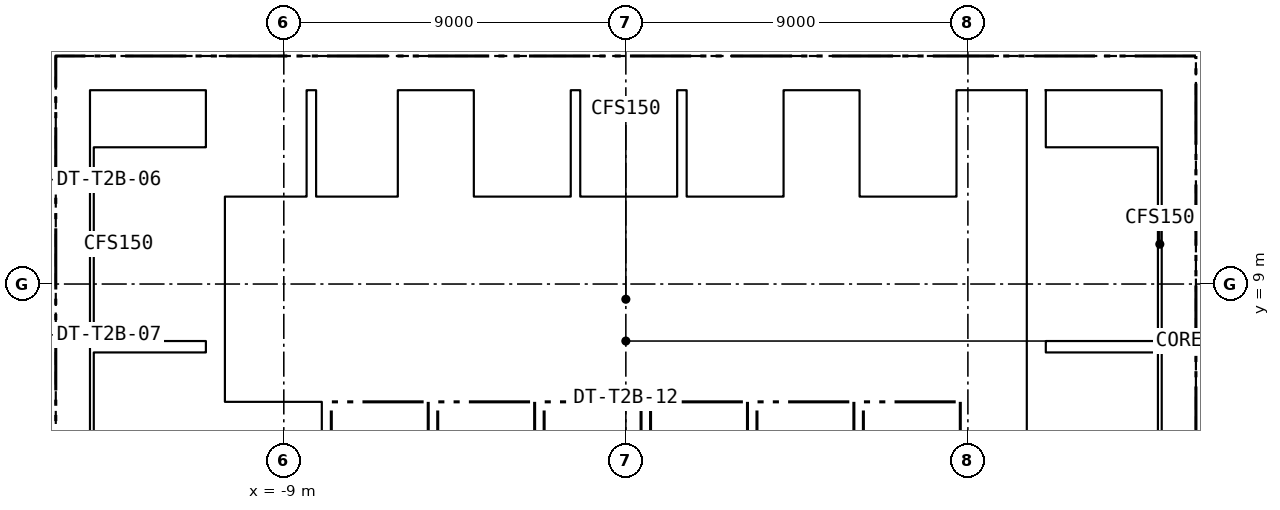
"""IFC4 building model, lengths in metres.
Left out: names, types, materials, properties, quantities, classifications, styles, units other than length and angle.
Written with IfcOpenShell. Run it as: python <this file> out.ifc"""

import sys

from ifc_helpers import new_model, si_unit, direction, frame, frame_2d, origin, place, context, subcontext, project, spatial, rectangle, extrude, element, fill, save


model = new_model("IFC4")
c1 = context("Model", 3, precision=1e-05, world=origin(), true_north=direction((0.0, 1.0)))
c2 = subcontext(c1, "Body", "Model", "MODEL_VIEW")
j1 = project(units=[si_unit("LENGTHUNIT", "METRE"), si_unit("PLANEANGLEUNIT", "RADIAN")], contexts=[c1])
p1 = place(None, origin())
s1 = spatial("IfcSite", under=j1, at=p1, CompositionType="ELEMENT")
p2 = place(p1, origin())
s2 = spatial("IfcBuilding", under=s1, at=p2, CompositionType="ELEMENT")
p3 = place(p2, frame((0.0, 0.0, 91.6)))
s3 = spatial("IfcBuildingStorey", under=s2, at=p3, CompositionType="ELEMENT", Elevation=91.6)
p4 = place(p3, frame((-15.0, 14.55, -0.15), z_axis=(0.0, 0.0, 1.0), x_axis=(1.0, 0.0, 0.0)))
e1 = element("IfcWall", 1, at=p4, inside=s3, PredefinedType="SOLIDWALL", context=c2, shape_type="SweptSolid", body=[
    extrude(rectangle(XDim=30.0, YDim=0.9, at=frame_2d((15.0, 0.0))), origin(), (0.0, 0.0, 1.0), 3.65),
])
p5 = place(p4, frame((9.25, 0.0, 0.15)))
e2 = element("IfcOpeningElement", 2, at=p5, cuts=e1, PredefinedType="OPENING", context=c2, shape_type="SweptSolid", body=[
    extrude(rectangle(XDim=1.5, YDim=2.1, at=frame_2d((0.75, 1.05))), frame((0.0, 0.46, 0.0), z_axis=(0.0, -1.0, 0.0), x_axis=(1.0, 0.0, 0.0)), (0.0, 0.0, 1.0), 0.92),
])
p6 = place(p4, frame((19.4, 0.0, 0.15)))
e3 = element("IfcOpeningElement", 3, at=p6, cuts=e1, PredefinedType="OPENING", context=c2, shape_type="SweptSolid", body=[
    extrude(rectangle(XDim=1.5, YDim=2.1, at=frame_2d((0.75, 1.05))), frame((0.0, 0.46, 0.0), z_axis=(0.0, -1.0, 0.0), x_axis=(1.0, 0.0, 0.0)), (0.0, 0.0, 1.0), 0.92),
])
p7 = place(p4, frame((1.5, 0.0, 0.15)))
e4 = element("IfcOpeningElement", 4, at=p7, cuts=e1, PredefinedType="OPENING", context=c2, shape_type="SweptSolid", body=[
    extrude(rectangle(XDim=1.2, YDim=2.1, at=frame_2d((0.6, 1.05))), frame((0.0, 0.46, 0.0), z_axis=(0.0, -1.0, 0.0), x_axis=(1.0, 0.0, 0.0)), (0.0, 0.0, 1.0), 0.92),
])
p8 = place(p4, frame((27.3, 0.0, 0.15)))
e5 = element("IfcOpeningElement", 5, at=p8, cuts=e1, PredefinedType="OPENING", context=c2, shape_type="SweptSolid", body=[
    extrude(rectangle(XDim=1.2, YDim=2.1, at=frame_2d((0.6, 1.05))), frame((0.0, 0.46, 0.0), z_axis=(0.0, -1.0, 0.0), x_axis=(1.0, 0.0, 0.0)), (0.0, 0.0, 1.0), 0.92),
])
for number, where, z_axis, x_axis in (
    (6, (-14.55, 0.9, -0.15), (0.0, 0.0, 1.0), (0.0, 1.0, 0.0)),
    (7, (14.55, 0.9, -0.15), (0.0, 0.0, 1.0), (0.0, 1.0, 0.0)),
):
    element("IfcWall", number, at=place(p3, frame(where, z_axis=z_axis, x_axis=x_axis)), inside=s3, PredefinedType="SOLIDWALL", context=c2, shape_type="SweptSolid", body=[
        extrude(rectangle(XDim=13.2, YDim=0.9, at=frame_2d((6.6, 0.0))), origin(), (0.0, 0.0, 1.0), 3.65),
    ])
for number, where, z_axis, x_axis in (
    (8, (-10.8, 0.9, -0.15), (0.0, 0.0, 1.0), (0.0, 1.0, 0.0)),
    (9, (10.8, 0.9, -0.15), (0.0, 0.0, 1.0), (0.0, 1.0, 0.0)),
):
    element("IfcWall", number, at=place(p3, frame(where, z_axis=z_axis, x_axis=x_axis)), inside=s3, PredefinedType="SOLIDWALL", context=c2, shape_type="SweptSolid", body=[
        extrude(rectangle(XDim=13.2, YDim=0.5, at=frame_2d((6.6, 0.0))), origin(), (0.0, 0.0, 1.0), 3.65),
    ])
p9 = place(p3, frame((-10.55, 6.025, 0.0), z_axis=(0.0, 0.0, 1.0), x_axis=(1.0, 0.0, 0.0)))
e10 = element("IfcWall", 10, at=p9, inside=s3, PredefinedType="PARTITIONING", context=c2, shape_type="SweptSolid", body=[
    extrude(rectangle(XDim=21.1, YDim=0.25, at=frame_2d((10.55, 0.0))), origin(), (0.0, 0.0, 1.0), 3.5),
])
p10 = place(p3, frame((-4.125, 8.55, 0.0), z_axis=(0.0, 0.0, 1.0), x_axis=(1.0, 0.0, 0.0)))
e11 = element("IfcWall", 11, at=p10, inside=s3, PredefinedType="PARTITIONING", context=c2, shape_type="SweptSolid", body=[
    extrude(rectangle(XDim=14.675, YDim=0.2, at=frame_2d((7.337, 0.0))), origin(), (0.0, 0.0, 1.0), 3.5),
])
p11 = place(p10, frame((2.438, 0.0, 0.0)))
e12 = element("IfcOpeningElement", 12, at=p11, cuts=e11, PredefinedType="OPENING", context=c2, shape_type="SweptSolid", body=[
    extrude(rectangle(XDim=1.0, YDim=2.1, at=frame_2d((0.5, 1.05))), frame((0.0, 0.11, 0.0), z_axis=(0.0, -1.0, 0.0), x_axis=(1.0, 0.0, 0.0)), (0.0, 0.0, 1.0), 0.22),
])
p12 = place(p10, frame((6.775, 0.0, 0.0)))
e13 = element("IfcOpeningElement", 13, at=p12, cuts=e11, PredefinedType="OPENING", context=c2, shape_type="SweptSolid", body=[
    extrude(rectangle(XDim=1.0, YDim=2.1, at=frame_2d((0.5, 1.05))), frame((0.0, 0.11, 0.0), z_axis=(0.0, -1.0, 0.0), x_axis=(1.0, 0.0, 0.0)), (0.0, 0.0, 1.0), 0.22),
])
p13 = place(p10, frame((10.363, 0.0, 0.0)))
e14 = element("IfcOpeningElement", 14, at=p13, cuts=e11, PredefinedType="OPENING", context=c2, shape_type="SweptSolid", body=[
    extrude(rectangle(XDim=1.0, YDim=2.1, at=frame_2d((0.5, 1.05))), frame((0.0, 0.11, 0.0), z_axis=(0.0, -1.0, 0.0), x_axis=(1.0, 0.0, 0.0)), (0.0, 0.0, 1.0), 0.22),
])
p14 = place(p10, frame((13.475, 0.0, 0.0)))
e15 = element("IfcOpeningElement", 15, at=p14, cuts=e11, PredefinedType="OPENING", context=c2, shape_type="SweptSolid", body=[
    extrude(rectangle(XDim=0.9, YDim=2.1, at=frame_2d((0.45, 1.05))), frame((0.0, 0.11, 0.0), z_axis=(0.0, -1.0, 0.0), x_axis=(1.0, 0.0, 0.0)), (0.0, 0.0, 1.0), 0.22),
])
p15 = place(p3, frame((-10.55, 11.2, 0.0), z_axis=(0.0, 0.0, 1.0), x_axis=(1.0, 0.0, 0.0)))
e16 = element("IfcWall", 16, at=p15, inside=s3, PredefinedType="PARTITIONING", context=c2, shape_type="SweptSolid", body=[
    extrude(rectangle(XDim=4.8, YDim=0.2, at=frame_2d((2.4, 0.0))), origin(), (0.0, 0.0, 1.0), 3.5),
])
p16 = place(p15, frame((0.525, 0.0, 0.0)))
e17 = element("IfcOpeningElement", 17, at=p16, cuts=e16, PredefinedType="OPENING", context=c2, shape_type="SweptSolid", body=[
    extrude(rectangle(XDim=1.1, YDim=2.1, at=frame_2d((0.55, 1.05))), frame((0.0, 0.11, 0.0), z_axis=(0.0, -1.0, 0.0), x_axis=(1.0, 0.0, 0.0)), (0.0, 0.0, 1.0), 0.22),
])
p17 = place(p15, frame((2.925, 0.0, 0.0)))
e18 = element("IfcOpeningElement", 18, at=p17, cuts=e16, PredefinedType="OPENING", context=c2, shape_type="SweptSolid", body=[
    extrude(rectangle(XDim=1.1, YDim=2.1, at=frame_2d((0.55, 1.05))), frame((0.0, 0.11, 0.0), z_axis=(0.0, -1.0, 0.0), x_axis=(1.0, 0.0, 0.0)), (0.0, 0.0, 1.0), 0.22),
])
p18 = place(p3, frame((-4.25, 11.2, 0.0), z_axis=(0.0, 0.0, 1.0), x_axis=(1.0, 0.0, 0.0)))
e19 = element("IfcWall", 19, at=p18, inside=s3, PredefinedType="PARTITIONING", context=c2, shape_type="SweptSolid", body=[
    extrude(rectangle(XDim=8.65, YDim=0.2, at=frame_2d((4.325, 0.0))), origin(), (0.0, 0.0, 1.0), 3.5),
])
p19 = place(p18, frame((0.825, 0.0, 0.0)))
e20 = element("IfcOpeningElement", 20, at=p19, cuts=e19, PredefinedType="OPENING", context=c2, shape_type="SweptSolid", body=[
    extrude(rectangle(XDim=1.4, YDim=2.1, at=frame_2d((0.7, 1.05))), frame((0.0, 0.11, 0.0), z_axis=(0.0, -1.0, 0.0), x_axis=(1.0, 0.0, 0.0)), (0.0, 0.0, 1.0), 0.22),
])
p20 = place(p18, frame((3.625, 0.0, 0.0)))
e21 = element("IfcOpeningElement", 21, at=p20, cuts=e19, PredefinedType="OPENING", context=c2, shape_type="SweptSolid", body=[
    extrude(rectangle(XDim=1.4, YDim=2.1, at=frame_2d((0.7, 1.05))), frame((0.0, 0.11, 0.0), z_axis=(0.0, -1.0, 0.0), x_axis=(1.0, 0.0, 0.0)), (0.0, 0.0, 1.0), 0.22),
])
p21 = place(p3, frame((5.9, 11.2, 0.0), z_axis=(0.0, 0.0, 1.0), x_axis=(1.0, 0.0, 0.0)))
e22 = element("IfcWall", 22, at=p21, inside=s3, PredefinedType="PARTITIONING", context=c2, shape_type="SweptSolid", body=[
    extrude(rectangle(XDim=4.65, YDim=0.2, at=frame_2d((2.325, 0.0))), origin(), (0.0, 0.0, 1.0), 3.5),
])
p22 = place(p21, frame((3.4, 0.0, 0.0)))
e23 = element("IfcOpeningElement", 23, at=p22, cuts=e22, PredefinedType="OPENING", context=c2, shape_type="SweptSolid", body=[
    extrude(rectangle(XDim=0.9, YDim=2.1, at=frame_2d((0.45, 1.05))), frame((0.0, 0.11, 0.0), z_axis=(0.0, -1.0, 0.0), x_axis=(1.0, 0.0, 0.0)), (0.0, 0.0, 1.0), 0.22),
])
p23 = place(p3, frame((-4.125, 6.15, 0.0), z_axis=(0.0, 0.0, 1.0), x_axis=(0.0, 1.0, 0.0)))
e24 = element("IfcWall", 24, at=p23, inside=s3, PredefinedType="PARTITIONING", context=c2, shape_type="SweptSolid", body=[
    extrude(rectangle(XDim=4.95, YDim=0.25, at=frame_2d((2.475, 0.0))), origin(), (0.0, 0.0, 1.0), 3.5),
])
p24 = place(p23, frame((3.125, 0.0, 0.0)))
e25 = element("IfcOpeningElement", 25, at=p24, cuts=e24, PredefinedType="OPENING", context=c2, shape_type="SweptSolid", body=[
    extrude(rectangle(XDim=1.2, YDim=2.1, at=frame_2d((0.6, 1.05))), frame((0.0, 0.135, 0.0), z_axis=(0.0, -1.0, 0.0), x_axis=(1.0, 0.0, 0.0)), (0.0, 0.0, 1.0), 0.27),
])
for number, where, z_axis, x_axis in (
    (26, (-7.875, 3.6, 0.0), (0.0, 0.0, 1.0), (0.0, 1.0, 0.0)),
    (27, (-5.075, 3.6, 0.0), (0.0, 0.0, 1.0), (0.0, 1.0, 0.0)),
    (28, (-2.275, 3.6, 0.0), (0.0, 0.0, 1.0), (0.0, 1.0, 0.0)),
    (29, (0.525, 3.6, 0.0), (0.0, 0.0, 1.0), (0.0, 1.0, 0.0)),
    (30, (3.325, 3.6, 0.0), (0.0, 0.0, 1.0), (0.0, 1.0, 0.0)),
    (31, (6.125, 3.6, 0.0), (0.0, 0.0, 1.0), (0.0, 1.0, 0.0)),
    (32, (8.925, 3.6, 0.0), (0.0, 0.0, 1.0), (0.0, 1.0, 0.0)),
):
    element("IfcWall", number, at=place(p3, frame(where, z_axis=z_axis, x_axis=x_axis)), inside=s3, PredefinedType="PARTITIONING", context=c2, shape_type="SweptSolid", body=[
        extrude(rectangle(XDim=2.3, YDim=0.25, at=frame_2d((1.15, 0.0))), origin(), (0.0, 0.0, 1.0), 3.5),
    ])
for number, where, z_axis, x_axis in (
    (33, (1.7, 6.15, 0.0), (0.0, 0.0, 1.0), (0.0, 1.0, 0.0)),
    (34, (4.6, 6.15, 0.0), (0.0, 0.0, 1.0), (0.0, 1.0, 0.0)),
):
    element("IfcWall", number, at=place(p3, frame(where, z_axis=z_axis, x_axis=x_axis)), inside=s3, PredefinedType="PARTITIONING", context=c2, shape_type="SweptSolid", body=[
        extrude(rectangle(XDim=2.3, YDim=0.15, at=frame_2d((1.15, 0.0))), origin(), (0.0, 0.0, 1.0), 3.5),
    ])
p25 = place(p3, frame((8.925, 6.15, 0.0), z_axis=(0.0, 0.0, 1.0), x_axis=(0.0, 1.0, 0.0)))
e35 = element("IfcWall", 35, at=p25, inside=s3, PredefinedType="PARTITIONING", context=c2, shape_type="SweptSolid", body=[
    extrude(rectangle(XDim=2.3, YDim=0.25, at=frame_2d((1.15, 0.0))), origin(), (0.0, 0.0, 1.0), 3.5),
])
for number, where, z_axis, x_axis in (
    (36, (-8.275, 11.3, 0.0), (0.0, 0.0, 1.0), (0.0, 1.0, 0.0)),
    (37, (-5.875, 11.3, 0.0), (0.0, 0.0, 1.0), (0.0, 1.0, 0.0)),
    (38, (-4.125, 11.3, 0.0), (0.0, 0.0, 1.0), (0.0, 1.0, 0.0)),
    (39, (-1.325, 11.3, 0.0), (0.0, 0.0, 1.0), (0.0, 1.0, 0.0)),
    (40, (1.475, 11.3, 0.0), (0.0, 0.0, 1.0), (0.0, 1.0, 0.0)),
    (41, (4.275, 11.3, 0.0), (0.0, 0.0, 1.0), (0.0, 1.0, 0.0)),
    (42, (6.025, 11.3, 0.0), (0.0, 0.0, 1.0), (0.0, 1.0, 0.0)),
    (43, (8.825, 11.3, 0.0), (0.0, 0.0, 1.0), (0.0, 1.0, 0.0)),
):
    element("IfcWall", number, at=place(p3, frame(where, z_axis=z_axis, x_axis=x_axis)), inside=s3, PredefinedType="PARTITIONING", context=c2, shape_type="SweptSolid", body=[
        extrude(rectangle(XDim=2.8, YDim=0.25, at=frame_2d((1.4, 0.0))), origin(), (0.0, 0.0, 1.0), 3.5),
    ])
p26 = place(p3, frame((-14.0, 7.35, 0.0), z_axis=(0.0, 0.0, 1.0), x_axis=(1.0, 0.0, 0.0)))
e44 = element("IfcWall", 44, at=p26, inside=s3, PredefinedType="SOLIDWALL", context=c2, shape_type="SweptSolid", body=[
    extrude(rectangle(XDim=2.95, YDim=0.3, at=frame_2d((1.475, 0.0))), origin(), (0.0, 0.0, 1.0), 3.5),
])
p27 = place(p3, frame((-14.05, 0.9, 0.0), z_axis=(0.0, 0.0, 1.0), x_axis=(0.0, 1.0, 0.0)))
e45 = element("IfcWall", 45, at=p27, inside=s3, PredefinedType="SOLIDWALL", context=c2, shape_type="SweptSolid", body=[
    extrude(rectangle(XDim=13.2, YDim=0.1, at=frame_2d((6.6, 0.0))), origin(), (0.0, 0.0, 1.0), 3.5),
])
p28 = place(p3, frame((11.05, 7.35, 0.0), z_axis=(0.0, 0.0, 1.0), x_axis=(1.0, 0.0, 0.0)))
e46 = element("IfcWall", 46, at=p28, inside=s3, PredefinedType="SOLIDWALL", context=c2, shape_type="SweptSolid", body=[
    extrude(rectangle(XDim=2.95, YDim=0.3, at=frame_2d((1.475, 0.0))), origin(), (0.0, 0.0, 1.0), 3.5),
])
p29 = place(p3, frame((14.05, 0.9, 0.0), z_axis=(0.0, 0.0, 1.0), x_axis=(0.0, 1.0, 0.0)))
e47 = element("IfcWall", 47, at=p29, inside=s3, PredefinedType="SOLIDWALL", context=c2, shape_type="SweptSolid", body=[
    extrude(rectangle(XDim=13.2, YDim=0.1, at=frame_2d((6.6, 0.0))), origin(), (0.0, 0.0, 1.0), 3.5),
])
p30 = place(p24, origin())
e48 = element("IfcDoor", 48, at=p30, inside=s3, OperationType="SINGLE_SWING_LEFT", PredefinedType="DOOR", context=c2, shape_type="SweptSolid", body=[
    extrude(rectangle(XDim=1.2, YDim=2.1, at=frame_2d((0.6, 1.05))), frame((0.0, 0.025, 0.0), z_axis=(0.0, -1.0, 0.0), x_axis=(1.0, 0.0, 0.0)), (0.0, 0.0, 1.0), 0.05),
])
fill(e25, e48)
p31 = place(p11, origin())
e49 = element("IfcDoor", 49, at=p31, inside=s3, OperationType="SINGLE_SWING_LEFT", PredefinedType="DOOR", context=c2, shape_type="SweptSolid", body=[
    extrude(rectangle(XDim=1.0, YDim=2.1, at=frame_2d((0.5, 1.05))), frame((0.0, 0.025, 0.0), z_axis=(0.0, -1.0, 0.0), x_axis=(1.0, 0.0, 0.0)), (0.0, 0.0, 1.0), 0.05),
])
fill(e12, e49)
p32 = place(p12, origin())
e50 = element("IfcDoor", 50, at=p32, inside=s3, OperationType="SINGLE_SWING_RIGHT", PredefinedType="DOOR", context=c2, shape_type="SweptSolid", body=[
    extrude(rectangle(XDim=1.0, YDim=2.1, at=frame_2d((0.5, 1.05))), frame((0.0, 0.025, 0.0), z_axis=(0.0, -1.0, 0.0), x_axis=(1.0, 0.0, 0.0)), (0.0, 0.0, 1.0), 0.05),
])
fill(e13, e50)
p33 = place(p13, origin())
e51 = element("IfcDoor", 51, at=p33, inside=s3, OperationType="SINGLE_SWING_LEFT", PredefinedType="DOOR", context=c2, shape_type="SweptSolid", body=[
    extrude(rectangle(XDim=1.0, YDim=2.1, at=frame_2d((0.5, 1.05))), frame((0.0, 0.025, 0.0), z_axis=(0.0, -1.0, 0.0), x_axis=(1.0, 0.0, 0.0)), (0.0, 0.0, 1.0), 0.05),
])
fill(e14, e51)
p34 = place(p14, origin())
e52 = element("IfcDoor", 52, at=p34, inside=s3, OperationType="SINGLE_SWING_RIGHT", PredefinedType="DOOR", context=c2, shape_type="SweptSolid", body=[
    extrude(rectangle(XDim=0.9, YDim=2.1, at=frame_2d((0.45, 1.05))), frame((0.0, 0.025, 0.0), z_axis=(0.0, -1.0, 0.0), x_axis=(1.0, 0.0, 0.0)), (0.0, 0.0, 1.0), 0.05),
])
fill(e15, e52)
p35 = place(p16, origin())
e53 = element("IfcDoor", 53, at=p35, inside=s3, OperationType="DOUBLE_DOOR_SLIDING", PredefinedType="DOOR", context=c2, shape_type="SweptSolid", body=[
    extrude(rectangle(XDim=1.1, YDim=2.1, at=frame_2d((0.55, 1.05))), frame((0.0, 0.025, 0.0), z_axis=(0.0, -1.0, 0.0), x_axis=(1.0, 0.0, 0.0)), (0.0, 0.0, 1.0), 0.05),
])
fill(e17, e53)
p36 = place(p17, origin())
e54 = element("IfcDoor", 54, at=p36, inside=s3, OperationType="DOUBLE_DOOR_SLIDING", PredefinedType="DOOR", context=c2, shape_type="SweptSolid", body=[
    extrude(rectangle(XDim=1.1, YDim=2.1, at=frame_2d((0.55, 1.05))), frame((0.0, 0.025, 0.0), z_axis=(0.0, -1.0, 0.0), x_axis=(1.0, 0.0, 0.0)), (0.0, 0.0, 1.0), 0.05),
])
fill(e18, e54)
p37 = place(p19, origin())
e55 = element("IfcDoor", 55, at=p37, inside=s3, OperationType="DOUBLE_DOOR_SLIDING", PredefinedType="DOOR", context=c2, shape_type="SweptSolid", body=[
    extrude(rectangle(XDim=1.4, YDim=2.1, at=frame_2d((0.7, 1.05))), frame((0.0, 0.025, 0.0), z_axis=(0.0, -1.0, 0.0), x_axis=(1.0, 0.0, 0.0)), (0.0, 0.0, 1.0), 0.05),
])
fill(e20, e55)
p38 = place(p20, origin())
e56 = element("IfcDoor", 56, at=p38, inside=s3, OperationType="DOUBLE_DOOR_SLIDING", PredefinedType="DOOR", context=c2, shape_type="SweptSolid", body=[
    extrude(rectangle(XDim=1.4, YDim=2.1, at=frame_2d((0.7, 1.05))), frame((0.0, 0.025, 0.0), z_axis=(0.0, -1.0, 0.0), x_axis=(1.0, 0.0, 0.0)), (0.0, 0.0, 1.0), 0.05),
])
fill(e21, e56)
p39 = place(p22, origin())
e57 = element("IfcDoor", 57, at=p39, inside=s3, OperationType="SINGLE_SWING_LEFT", PredefinedType="DOOR", context=c2, shape_type="SweptSolid", body=[
    extrude(rectangle(XDim=0.9, YDim=2.1, at=frame_2d((0.45, 1.05))), frame((0.0, 0.025, 0.0), z_axis=(0.0, -1.0, 0.0), x_axis=(1.0, 0.0, 0.0)), (0.0, 0.0, 1.0), 0.05),
])
fill(e23, e57)
p40 = place(p5, origin())
e58 = element("IfcDoor", 58, at=p40, inside=s3, OperationType="DOUBLE_DOOR_SINGLE_SWING", PredefinedType="DOOR", context=c2, shape_type="SweptSolid", body=[
    extrude(rectangle(XDim=1.5, YDim=2.1, at=frame_2d((0.75, 1.05))), frame((0.0, 0.025, 0.0), z_axis=(0.0, -1.0, 0.0), x_axis=(1.0, 0.0, 0.0)), (0.0, 0.0, 1.0), 0.05),
])
fill(e2, e58)
p41 = place(p6, origin())
e59 = element("IfcDoor", 59, at=p41, inside=s3, OperationType="DOUBLE_DOOR_SINGLE_SWING", PredefinedType="DOOR", context=c2, shape_type="SweptSolid", body=[
    extrude(rectangle(XDim=1.5, YDim=2.1, at=frame_2d((0.75, 1.05))), frame((0.0, 0.025, 0.0), z_axis=(0.0, -1.0, 0.0), x_axis=(1.0, 0.0, 0.0)), (0.0, 0.0, 1.0), 0.05),
])
fill(e3, e59)
p42 = place(p7, origin())
e60 = element("IfcDoor", 60, at=p42, inside=s3, OperationType="SINGLE_SWING_RIGHT", PredefinedType="DOOR", context=c2, shape_type="SweptSolid", body=[
    extrude(rectangle(XDim=1.2, YDim=2.1, at=frame_2d((0.6, 1.05))), frame((0.0, 0.025, 0.0), z_axis=(0.0, -1.0, 0.0), x_axis=(1.0, 0.0, 0.0)), (0.0, 0.0, 1.0), 0.05),
])
fill(e4, e60)
p43 = place(p8, origin())
e61 = element("IfcDoor", 61, at=p43, inside=s3, OperationType="SINGLE_SWING_LEFT", PredefinedType="DOOR", context=c2, shape_type="SweptSolid", body=[
    extrude(rectangle(XDim=1.2, YDim=2.1, at=frame_2d((0.6, 1.05))), frame((0.0, 0.025, 0.0), z_axis=(0.0, -1.0, 0.0), x_axis=(1.0, 0.0, 0.0)), (0.0, 0.0, 1.0), 0.05),
])
fill(e5, e61)
save(model, sys.argv[1])
